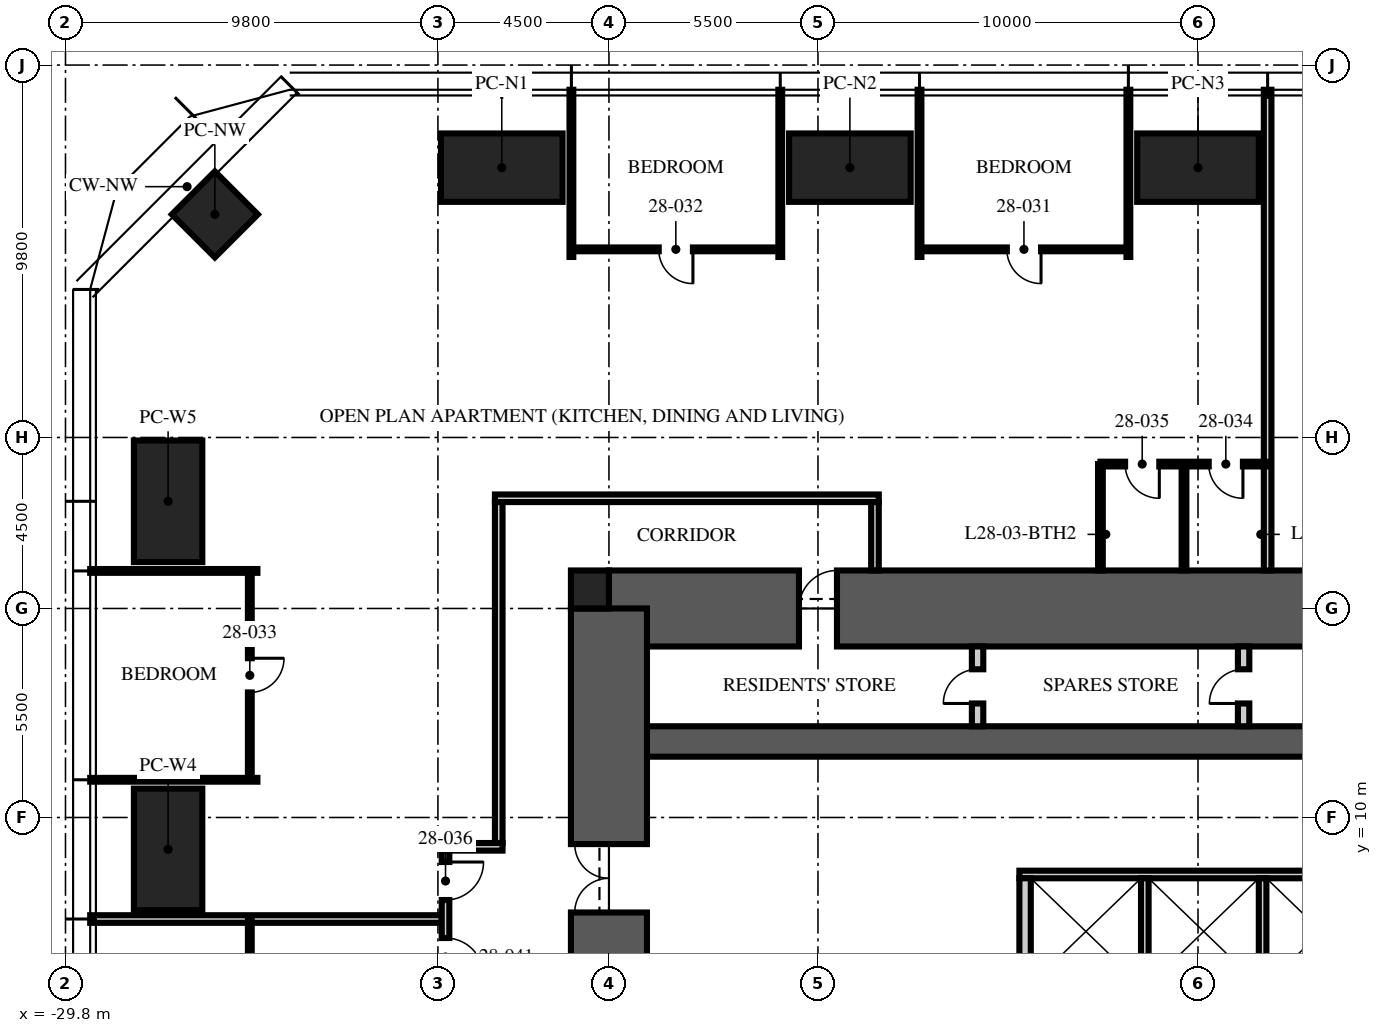
"""IFC4 building model, lengths in metres.
Left out: names, types, materials, properties, quantities, classifications, styles, units other than length and angle.
Written with IfcOpenShell. Run it as: python <this file> out.ifc"""

import sys

from ifc_helpers import new_model, si_unit, direction, frame, frame_2d, origin, origin_2d, place, context, subcontext, project, spatial, rectangle, hollow_rectangle, extrude, element, fill, save


model = new_model("IFC4")
c1 = context("Model", 3, precision=1e-05, world=origin(), true_north=direction((0.0, 1.0)))
c2 = subcontext(c1, "Body", "Model", "MODEL_VIEW")
j1 = project(units=[si_unit("LENGTHUNIT", "METRE"), si_unit("PLANEANGLEUNIT", "RADIAN")], contexts=[c1])
p1 = place(None, origin())
s1 = spatial("IfcSite", under=j1, at=p1, CompositionType="ELEMENT")
p2 = place(p1, origin())
s2 = spatial("IfcBuilding", under=s1, at=p2, CompositionType="ELEMENT")
p3 = place(p2, frame((0.0, 0.0, 114.75)))
s3 = spatial("IfcBuildingStorey", under=s2, at=p3, CompositionType="ELEMENT", Elevation=114.75)
p4 = place(p3, frame((-15.5, 15.5, -0.25), z_axis=(0.0, 0.0, 1.0), x_axis=(1.0, 0.0, 0.0)))
e1 = element("IfcWall", 1, at=p4, inside=s3, PredefinedType="SHEAR", context=c2, shape_type="SweptSolid", body=[
    extrude(rectangle(XDim=31.0, YDim=2.0, at=frame_2d((15.5, 0.0))), origin(), (0.0, 0.0, 1.0), 3.75),
])
p5 = place(p4, frame((5.0, 0.0, 0.25)))
e2 = element("IfcOpeningElement", 2, at=p5, cuts=e1, PredefinedType="OPENING", context=c2, shape_type="SweptSolid", body=[
    extrude(rectangle(XDim=1.0, YDim=2.1, at=frame_2d((0.5, 1.05))), frame((0.0, 1.01, 0.0), z_axis=(0.0, -1.0, 0.0), x_axis=(1.0, 0.0, 0.0)), (0.0, 0.0, 1.0), 2.02),
])
p6 = place(p3, frame((-15.5, 12.0, -0.25), z_axis=(0.0, 0.0, 1.0), x_axis=(1.0, 0.0, 0.0)))
e3 = element("IfcWall", 3, at=p6, inside=s3, PredefinedType="SHEAR", context=c2, shape_type="SweptSolid", body=[
    extrude(rectangle(XDim=31.0, YDim=0.8, at=frame_2d((15.5, 0.0))), origin(), (0.0, 0.0, 1.0), 3.75),
])
p7 = place(p3, frame((-15.5, -15.5, -0.25), z_axis=(0.0, 0.0, 1.0), x_axis=(0.0, 1.0, 0.0)))
e4 = element("IfcWall", 4, at=p7, inside=s3, PredefinedType="SHEAR", context=c2, shape_type="SweptSolid", body=[
    extrude(rectangle(XDim=31.0, YDim=2.0, at=frame_2d((15.5, 0.0))), origin(), (0.0, 0.0, 1.0), 3.75),
])
p8 = place(p7, frame((6.5, 0.0, 0.25)))
e5 = element("IfcOpeningElement", 5, at=p8, cuts=e4, PredefinedType="OPENING", context=c2, shape_type="SweptSolid", body=[
    extrude(rectangle(XDim=1.2, YDim=2.1, at=frame_2d((0.6, 1.05))), frame((0.0, 1.01, 0.0), z_axis=(0.0, -1.0, 0.0), x_axis=(1.0, 0.0, 0.0)), (0.0, 0.0, 1.0), 2.02),
])
p9 = place(p7, frame((23.0, 0.0, 0.25)))
e6 = element("IfcOpeningElement", 6, at=p9, cuts=e4, PredefinedType="OPENING", context=c2, shape_type="SweptSolid", body=[
    extrude(rectangle(XDim=1.8, YDim=2.1, at=frame_2d((0.9, 1.05))), frame((0.0, 1.01, 0.0), z_axis=(0.0, -1.0, 0.0), x_axis=(1.0, 0.0, 0.0)), (0.0, 0.0, 1.0), 2.02),
])
p10 = place(p3, frame((-16.0, 16.0, -0.25), z_axis=(0.0, 0.0, 1.0), x_axis=(1.0, 0.0, 0.0)))
e7 = element("IfcColumn", 7, at=p10, inside=s3, PredefinedType="COLUMN", context=c2, shape_type="SweptSolid", body=[
    extrude(rectangle(XDim=1.0, YDim=1.0, at=origin_2d()), origin(), (0.0, 0.0, 1.0), 3.75),
])
for number, where, z_axis, x_axis in (
    (8, (-18.32, 27.1, 0.0), (0.0, 0.0, 1.0), (1.0, 0.0, 0.0)),
    (9, (-9.16, 27.1, 0.0), (0.0, 0.0, 1.0), (1.0, 0.0, 0.0)),
    (10, (0.0, 27.1, 0.0), (0.0, 0.0, 1.0), (1.0, 0.0, 0.0)),
    (11, (-27.1, 9.16, 0.0), (0.0, 0.0, 1.0), (0.0, 1.0, 0.0)),
    (12, (-27.1, 18.32, 0.0), (0.0, 0.0, 1.0), (0.0, 1.0, 0.0)),
):
    element("IfcColumn", number, at=place(p3, frame(where, z_axis=z_axis, x_axis=x_axis)), inside=s3, PredefinedType="COLUMN", context=c2, shape_type="SweptSolid", body=[
        extrude(hollow_rectangle(XDim=3.2, YDim=1.8, WallThickness=0.2, at=origin_2d()), origin(), (0.0, 0.0, 1.0), 3.75),
    ])
p11 = place(p3, frame((-25.87, 25.87, 0.0), z_axis=(0.0, 0.0, 1.0), x_axis=(0.707106781187, 0.707106781187, 0.0)))
e13 = element("IfcColumn", 13, at=p11, inside=s3, PredefinedType="COLUMN", context=c2, shape_type="SweptSolid", body=[
    extrude(hollow_rectangle(XDim=1.6, YDim=1.6, WallThickness=0.1, at=origin_2d()), origin(), (0.0, 0.0, 1.0), 3.75),
])
p12 = place(p3, frame((-4.7, 8.5, 0.0), z_axis=(0.0, 0.0, 1.0), x_axis=(1.0, 0.0, 0.0)))
e14 = element("IfcWall", 14, at=p12, inside=s3, PredefinedType="PARTITIONING", context=c2, shape_type="SweptSolid", body=[
    extrude(rectangle(XDim=9.7, YDim=0.2, at=frame_2d((4.85, 0.0))), origin(), (0.0, 0.0, 1.0), 3.5),
])
p13 = place(p3, frame((-4.55, 5.6, 0.0), z_axis=(0.0, 0.0, 1.0), x_axis=(0.0, 1.0, 0.0)))
e15 = element("IfcWall", 15, at=p13, inside=s3, PredefinedType="PARTITIONING", context=c2, shape_type="SweptSolid", body=[
    extrude(rectangle(XDim=2.8, YDim=0.3, at=frame_2d((1.4, 0.0))), origin(), (0.0, 0.0, 1.0), 3.5),
])
for number, where, z_axis, x_axis in (
    (16, (-1.4, 5.6, 0.0), (0.0, 0.0, 1.0), (0.0, 1.0, 0.0)),
    (17, (1.7, 5.6, 0.0), (0.0, 0.0, 1.0), (0.0, 1.0, 0.0)),
):
    element("IfcWall", number, at=place(p3, frame(where, z_axis=z_axis, x_axis=x_axis)), inside=s3, PredefinedType="PARTITIONING", context=c2, shape_type="SweptSolid", body=[
        extrude(rectangle(XDim=2.8, YDim=0.2, at=frame_2d((1.4, 0.0))), origin(), (0.0, 0.0, 1.0), 3.5),
    ])
p14 = place(p3, frame((-5.8, 12.4, 0.0), z_axis=(0.0, 0.0, 1.0), x_axis=(0.0, 1.0, 0.0)))
e18 = element("IfcWall", 18, at=p14, inside=s3, PredefinedType="PARTITIONING", context=c2, shape_type="SweptSolid", body=[
    extrude(rectangle(XDim=2.1, YDim=0.3, at=frame_2d((1.05, 0.0))), origin(), (0.0, 0.0, 1.0), 3.5),
])
p15 = place(p14, frame((0.6, 0.0, 0.0)))
e19 = element("IfcOpeningElement", 19, at=p15, cuts=e18, PredefinedType="OPENING", context=c2, shape_type="SweptSolid", body=[
    extrude(rectangle(XDim=0.9, YDim=2.1, at=frame_2d((0.45, 1.05))), frame((0.0, 0.16, 0.0), z_axis=(0.0, -1.0, 0.0), x_axis=(1.0, 0.0, 0.0)), (0.0, 0.0, 1.0), 0.32),
])
p16 = place(p3, frame((1.2, 12.4, 0.0), z_axis=(0.0, 0.0, 1.0), x_axis=(0.0, 1.0, 0.0)))
e20 = element("IfcWall", 20, at=p16, inside=s3, PredefinedType="PARTITIONING", context=c2, shape_type="SweptSolid", body=[
    extrude(rectangle(XDim=2.1, YDim=0.3, at=frame_2d((1.05, 0.0))), origin(), (0.0, 0.0, 1.0), 3.5),
])
p17 = place(p16, frame((0.6, 0.0, 0.0)))
e21 = element("IfcOpeningElement", 21, at=p17, cuts=e20, PredefinedType="OPENING", context=c2, shape_type="SweptSolid", body=[
    extrude(rectangle(XDim=0.9, YDim=2.1, at=frame_2d((0.45, 1.05))), frame((0.0, 0.16, 0.0), z_axis=(0.0, -1.0, 0.0), x_axis=(1.0, 0.0, 0.0)), (0.0, 0.0, 1.0), 0.32),
])
p18 = place(p3, frame((-18.5, 18.4, 0.0), z_axis=(0.0, 0.0, 1.0), x_axis=(1.0, 0.0, 0.0)))
e22 = element("IfcWall", 22, at=p18, inside=s3, PredefinedType="PARTITIONING", context=c2, shape_type="SweptSolid", body=[
    extrude(rectangle(XDim=10.1, YDim=0.2, at=frame_2d((5.05, 0.0))), origin(), (0.0, 0.0, 1.0), 2.3),
])
p19 = place(p3, frame((-8.5, 18.3, 0.0), z_axis=(0.0, 0.0, 1.0), x_axis=(0.0, -1.0, 0.0)))
e23 = element("IfcWall", 23, at=p19, inside=s3, PredefinedType="PARTITIONING", context=c2, shape_type="SweptSolid", body=[
    extrude(rectangle(XDim=1.8, YDim=0.2, at=frame_2d((0.9, 0.0))), origin(), (0.0, 0.0, 1.0), 3.5),
])
p20 = place(p3, frame((1.832, 16.5, 0.0), z_axis=(0.0, 0.0, 1.0), x_axis=(0.0, 1.0, 0.0)))
e24 = element("IfcWall", 24, at=p20, inside=s3, PredefinedType="PARTITIONING", context=c2, shape_type="SweptSolid", body=[
    extrude(rectangle(XDim=12.65, YDim=0.2, at=frame_2d((6.325, 0.0))), origin(), (0.0, 0.0, 1.0), 2.81),
])
for number, where, z_axis, x_axis in (
    (25, (-1.832, 24.75, 0.0), (0.0, 0.0, 1.0), (0.0, 1.0, 0.0)),
    (26, (-7.328, 24.75, 0.0), (0.0, 0.0, 1.0), (0.0, 1.0, 0.0)),
    (27, (-10.992, 24.75, 0.0), (0.0, 0.0, 1.0), (0.0, 1.0, 0.0)),
    (28, (-16.488, 24.75, 0.0), (0.0, 0.0, 1.0), (0.0, 1.0, 0.0)),
    (29, (-24.75, 16.488, 0.0), (0.0, 0.0, 1.0), (-1.0, 0.0, 0.0)),
    (30, (-24.75, 10.992, 0.0), (0.0, 0.0, 1.0), (-1.0, 0.0, 0.0)),
):
    element("IfcWall", number, at=place(p3, frame(where, z_axis=z_axis, x_axis=x_axis)), inside=s3, PredefinedType="PARTITIONING", context=c2, shape_type="SweptSolid", body=[
        extrude(rectangle(XDim=4.4, YDim=0.1, at=frame_2d((2.2, 0.0))), origin(), (0.0, 0.0, 1.0), 2.81),
    ])
p21 = place(p3, frame((-19.9, 7.328, 0.0), z_axis=(0.0, 0.0, 1.0), x_axis=(-1.0, 0.0, 0.0)))
e31 = element("IfcWall", 31, at=p21, inside=s3, PredefinedType="PARTITIONING", context=c2, shape_type="SweptSolid", body=[
    extrude(rectangle(XDim=9.25, YDim=0.2, at=frame_2d((4.625, 0.0))), origin(), (0.0, 0.0, 1.0), 2.81),
])
p22 = place(p3, frame((-1.832, 24.95, 0.0), z_axis=(0.0, 0.0, 1.0), x_axis=(-1.0, 0.0, 0.0)))
e32 = element("IfcWall", 32, at=p22, inside=s3, PredefinedType="PARTITIONING", context=c2, shape_type="SweptSolid", body=[
    extrude(rectangle(XDim=5.496, YDim=0.1, at=frame_2d((2.748, 0.0))), origin(), (0.0, 0.0, 1.0), 2.81),
])
p23 = place(p22, frame((2.298, 0.0, 0.0)))
e33 = element("IfcOpeningElement", 33, at=p23, cuts=e32, PredefinedType="OPENING", context=c2, shape_type="SweptSolid", body=[
    extrude(rectangle(XDim=0.9, YDim=2.1, at=frame_2d((0.45, 1.05))), frame((0.0, 0.06, 0.0), z_axis=(0.0, -1.0, 0.0), x_axis=(1.0, 0.0, 0.0)), (0.0, 0.0, 1.0), 0.12),
])
p24 = place(p3, frame((-10.992, 24.95, 0.0), z_axis=(0.0, 0.0, 1.0), x_axis=(-1.0, 0.0, 0.0)))
e34 = element("IfcWall", 34, at=p24, inside=s3, PredefinedType="PARTITIONING", context=c2, shape_type="SweptSolid", body=[
    extrude(rectangle(XDim=5.496, YDim=0.1, at=frame_2d((2.748, 0.0))), origin(), (0.0, 0.0, 1.0), 2.81),
])
p25 = place(p24, frame((2.298, 0.0, 0.0)))
e35 = element("IfcOpeningElement", 35, at=p25, cuts=e34, PredefinedType="OPENING", context=c2, shape_type="SweptSolid", body=[
    extrude(rectangle(XDim=0.9, YDim=2.1, at=frame_2d((0.45, 1.05))), frame((0.0, 0.06, 0.0), z_axis=(0.0, -1.0, 0.0), x_axis=(1.0, 0.0, 0.0)), (0.0, 0.0, 1.0), 0.12),
])
p26 = place(p3, frame((-24.95, 16.488, 0.0), z_axis=(0.0, 0.0, 1.0), x_axis=(0.0, -1.0, 0.0)))
e36 = element("IfcWall", 36, at=p26, inside=s3, PredefinedType="PARTITIONING", context=c2, shape_type="SweptSolid", body=[
    extrude(rectangle(XDim=5.496, YDim=0.1, at=frame_2d((2.748, 0.0))), origin(), (0.0, 0.0, 1.0), 2.81),
])
p27 = place(p26, frame((2.298, 0.0, 0.0)))
e37 = element("IfcOpeningElement", 37, at=p27, cuts=e36, PredefinedType="OPENING", context=c2, shape_type="SweptSolid", body=[
    extrude(rectangle(XDim=0.9, YDim=2.1, at=frame_2d((0.45, 1.05))), frame((0.0, 0.06, 0.0), z_axis=(0.0, -1.0, 0.0), x_axis=(1.0, 0.0, 0.0)), (0.0, 0.0, 1.0), 0.12),
])
p28 = place(p3, frame((1.832, 19.3, 0.0), z_axis=(0.0, 0.0, 1.0), x_axis=(-1.0, 0.0, 0.0)))
e38 = element("IfcWall", 38, at=p28, inside=s3, PredefinedType="PARTITIONING", context=c2, shape_type="SweptSolid", body=[
    extrude(rectangle(XDim=4.4, YDim=0.125, at=frame_2d((2.2, 0.0))), origin(), (0.0, 0.0, 1.0), 2.7),
])
p29 = place(p28, frame((0.65, 0.0, 0.0)))
e39 = element("IfcOpeningElement", 39, at=p29, cuts=e38, PredefinedType="OPENING", context=c2, shape_type="SweptSolid", body=[
    extrude(rectangle(XDim=0.9, YDim=2.1, at=frame_2d((0.45, 1.05))), frame((0.0, 0.073, 0.0), z_axis=(0.0, -1.0, 0.0), x_axis=(1.0, 0.0, 0.0)), (0.0, 0.0, 1.0), 0.145),
])
p30 = place(p28, frame((2.85, 0.0, 0.0)))
e40 = element("IfcOpeningElement", 40, at=p30, cuts=e38, PredefinedType="OPENING", context=c2, shape_type="SweptSolid", body=[
    extrude(rectangle(XDim=0.9, YDim=2.1, at=frame_2d((0.45, 1.05))), frame((0.0, 0.073, 0.0), z_axis=(0.0, -1.0, 0.0), x_axis=(1.0, 0.0, 0.0)), (0.0, 0.0, 1.0), 0.145),
])
for number, where, z_axis, x_axis in (
    (41, (-0.368, 16.5, 0.0), (0.0, 0.0, 1.0), (0.0, 1.0, 0.0)),
    (42, (-2.568, 16.5, 0.0), (0.0, 0.0, 1.0), (0.0, 1.0, 0.0)),
):
    element("IfcWall", number, at=place(p3, frame(where, z_axis=z_axis, x_axis=x_axis)), inside=s3, PredefinedType="PARTITIONING", context=c2, shape_type="SweptSolid", body=[
        extrude(rectangle(XDim=2.8, YDim=0.125, at=frame_2d((1.4, 0.0))), origin(), (0.0, 0.0, 1.0), 3.5),
    ])
p31 = place(p3, frame((-24.95, 7.328, 0.0), z_axis=(0.0, 0.0, 1.0), x_axis=(0.0, -1.0, 0.0)))
e43 = element("IfcWall", 43, at=p31, inside=s3, PredefinedType="PARTITIONING", context=c2, shape_type="SweptSolid", body=[
    extrude(rectangle(XDim=5.496, YDim=0.1, at=frame_2d((2.748, 0.0))), origin(), (0.0, 0.0, 1.0), 2.81),
])
p32 = place(p31, frame((2.298, 0.0, 0.0)))
e44 = element("IfcOpeningElement", 44, at=p32, cuts=e43, PredefinedType="OPENING", context=c2, shape_type="SweptSolid", body=[
    extrude(rectangle(XDim=0.9, YDim=2.1, at=frame_2d((0.45, 1.05))), frame((0.0, 0.06, 0.0), z_axis=(0.0, -1.0, 0.0), x_axis=(1.0, 0.0, 0.0)), (0.0, 0.0, 1.0), 0.12),
])
p33 = place(p3, frame((-18.4, 18.3, 0.0), z_axis=(0.0, 0.0, 1.0), x_axis=(0.0, -1.0, 0.0)))
e45 = element("IfcWall", 45, at=p33, inside=s3, PredefinedType="PARTITIONING", context=c2, shape_type="SweptSolid", body=[
    extrude(rectangle(XDim=8.972, YDim=0.2, at=frame_2d((4.486, 0.0))), origin(), (0.0, 0.0, 1.0), 2.3),
])
p34 = place(p3, frame((-18.3, 9.228, 0.0), z_axis=(0.0, 0.0, 1.0), x_axis=(-1.0, 0.0, 0.0)))
e46 = element("IfcWall", 46, at=p34, inside=s3, PredefinedType="PARTITIONING", context=c2, shape_type="SweptSolid", body=[
    extrude(rectangle(XDim=1.6, YDim=0.2, at=frame_2d((0.8, 0.0))), origin(), (0.0, 0.0, 1.0), 2.7),
])
p35 = place(p3, frame((-19.8, 9.128, 0.0), z_axis=(0.0, 0.0, 1.0), x_axis=(0.0, -1.0, 0.0)))
e47 = element("IfcWall", 47, at=p35, inside=s3, PredefinedType="PARTITIONING", context=c2, shape_type="SweptSolid", body=[
    extrude(rectangle(XDim=3.6, YDim=0.2, at=frame_2d((1.8, 0.0))), origin(), (0.0, 0.0, 1.0), 2.7),
])
p36 = place(p35, frame((0.3, 0.0, 0.0)))
e48 = element("IfcOpeningElement", 48, at=p36, cuts=e47, PredefinedType="OPENING", context=c2, shape_type="SweptSolid", body=[
    extrude(rectangle(XDim=1.0, YDim=2.2, at=frame_2d((0.5, 1.1))), frame((0.0, 0.11, 0.0), z_axis=(0.0, -1.0, 0.0), x_axis=(1.0, 0.0, 0.0)), (0.0, 0.0, 1.0), 0.22),
])
p37 = place(p35, frame((2.3, 0.0, 0.0)))
e49 = element("IfcOpeningElement", 49, at=p37, cuts=e47, PredefinedType="OPENING", context=c2, shape_type="SweptSolid", body=[
    extrude(rectangle(XDim=1.0, YDim=2.2, at=frame_2d((0.5, 1.1))), frame((0.0, 0.11, 0.0), z_axis=(0.0, -1.0, 0.0), x_axis=(1.0, 0.0, 0.0)), (0.0, 0.0, 1.0), 0.22),
])
p38 = place(p9, origin())
e50 = element("IfcDoor", 50, at=p38, inside=s3, OperationType="DOUBLE_DOOR_SINGLE_SWING", PredefinedType="DOOR", context=c2, shape_type="SweptSolid", body=[
    extrude(rectangle(XDim=1.8, YDim=2.1, at=frame_2d((0.9, 1.05))), frame((0.0, 0.025, 0.0), z_axis=(0.0, -1.0, 0.0), x_axis=(1.0, 0.0, 0.0)), (0.0, 0.0, 1.0), 0.05),
])
fill(e6, e50)
p39 = place(p15, origin())
e51 = element("IfcDoor", 51, at=p39, inside=s3, OperationType="SINGLE_SWING_LEFT", PredefinedType="DOOR", context=c2, shape_type="SweptSolid", body=[
    extrude(rectangle(XDim=0.9, YDim=2.1, at=frame_2d((0.45, 1.05))), frame((0.0, 0.025, 0.0), z_axis=(0.0, -1.0, 0.0), x_axis=(1.0, 0.0, 0.0)), (0.0, 0.0, 1.0), 0.05),
])
fill(e19, e51)
p40 = place(p17, origin())
e52 = element("IfcDoor", 52, at=p40, inside=s3, OperationType="SINGLE_SWING_LEFT", PredefinedType="DOOR", context=c2, shape_type="SweptSolid", body=[
    extrude(rectangle(XDim=0.9, YDim=2.1, at=frame_2d((0.45, 1.05))), frame((0.0, 0.025, 0.0), z_axis=(0.0, -1.0, 0.0), x_axis=(1.0, 0.0, 0.0)), (0.0, 0.0, 1.0), 0.05),
])
fill(e21, e52)
p41 = place(p5, origin())
e53 = element("IfcDoor", 53, at=p41, inside=s3, OperationType="SINGLE_SWING_RIGHT", PredefinedType="DOOR", context=c2, shape_type="SweptSolid", body=[
    extrude(rectangle(XDim=1.0, YDim=2.1, at=frame_2d((0.5, 1.05))), frame((0.0, 0.025, 0.0), z_axis=(0.0, -1.0, 0.0), x_axis=(1.0, 0.0, 0.0)), (0.0, 0.0, 1.0), 0.05),
])
fill(e2, e53)
p42 = place(p23, origin())
e54 = element("IfcDoor", 54, at=p42, inside=s3, OperationType="SINGLE_SWING_LEFT", PredefinedType="DOOR", context=c2, shape_type="SweptSolid", body=[
    extrude(rectangle(XDim=0.9, YDim=2.1, at=frame_2d((0.45, 1.05))), frame((0.0, 0.025, 0.0), z_axis=(0.0, -1.0, 0.0), x_axis=(1.0, 0.0, 0.0)), (0.0, 0.0, 1.0), 0.05),
])
fill(e33, e54)
p43 = place(p25, origin())
e55 = element("IfcDoor", 55, at=p43, inside=s3, OperationType="SINGLE_SWING_LEFT", PredefinedType="DOOR", context=c2, shape_type="SweptSolid", body=[
    extrude(rectangle(XDim=0.9, YDim=2.1, at=frame_2d((0.45, 1.05))), frame((0.0, 0.025, 0.0), z_axis=(0.0, -1.0, 0.0), x_axis=(1.0, 0.0, 0.0)), (0.0, 0.0, 1.0), 0.05),
])
fill(e35, e55)
p44 = place(p27, origin())
e56 = element("IfcDoor", 56, at=p44, inside=s3, OperationType="SINGLE_SWING_LEFT", PredefinedType="DOOR", context=c2, shape_type="SweptSolid", body=[
    extrude(rectangle(XDim=0.9, YDim=2.1, at=frame_2d((0.45, 1.05))), frame((0.0, 0.025, 0.0), z_axis=(0.0, -1.0, 0.0), x_axis=(1.0, 0.0, 0.0)), (0.0, 0.0, 1.0), 0.05),
])
fill(e37, e56)
p45 = place(p29, origin())
e57 = element("IfcDoor", 57, at=p45, inside=s3, OperationType="SINGLE_SWING_LEFT", PredefinedType="DOOR", context=c2, shape_type="SweptSolid", body=[
    extrude(rectangle(XDim=0.9, YDim=2.1, at=frame_2d((0.45, 1.05))), frame((0.0, 0.025, 0.0), z_axis=(0.0, -1.0, 0.0), x_axis=(1.0, 0.0, 0.0)), (0.0, 0.0, 1.0), 0.05),
])
fill(e39, e57)
p46 = place(p30, origin())
e58 = element("IfcDoor", 58, at=p46, inside=s3, OperationType="SINGLE_SWING_LEFT", PredefinedType="DOOR", context=c2, shape_type="SweptSolid", body=[
    extrude(rectangle(XDim=0.9, YDim=2.1, at=frame_2d((0.45, 1.05))), frame((0.0, 0.025, 0.0), z_axis=(0.0, -1.0, 0.0), x_axis=(1.0, 0.0, 0.0)), (0.0, 0.0, 1.0), 0.05),
])
fill(e40, e58)
p47 = place(p36, origin())
e59 = element("IfcDoor", 59, at=p47, inside=s3, OperationType="SINGLE_SWING_LEFT", PredefinedType="DOOR", context=c2, shape_type="SweptSolid", body=[
    extrude(rectangle(XDim=1.0, YDim=2.2, at=frame_2d((0.5, 1.1))), frame((0.0, 0.025, 0.0), z_axis=(0.0, -1.0, 0.0), x_axis=(1.0, 0.0, 0.0)), (0.0, 0.0, 1.0), 0.05),
])
fill(e48, e59)
p48 = place(p37, origin())
e60 = element("IfcDoor", 60, at=p48, inside=s3, OperationType="SINGLE_SWING_RIGHT", PredefinedType="DOOR", context=c2, shape_type="SweptSolid", body=[
    extrude(rectangle(XDim=1.0, YDim=2.2, at=frame_2d((0.5, 1.1))), frame((0.0, 0.025, 0.0), z_axis=(0.0, -1.0, 0.0), x_axis=(1.0, 0.0, 0.0)), (0.0, 0.0, 1.0), 0.05),
])
fill(e49, e60)
save(model, sys.argv[1])
